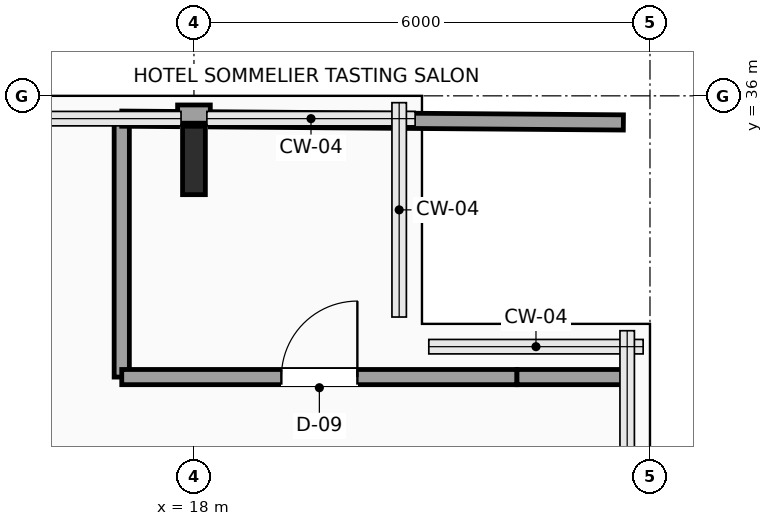
"""IFC4 building model, lengths in metres.
Left out: names, types, materials, properties, quantities, classifications, styles, units other than length and angle.
Written with IfcOpenShell. Run it as: python <this file> out.ifc"""

import sys

from ifc_helpers import new_model, si_unit, direction, frame, frame_2d, origin, origin_2d, place, context, subcontext, project, spatial, rectangle, i_section, extrude, element, fill, save


model = new_model("IFC4")
c1 = context("Model", 3, precision=1e-05, world=origin(), true_north=direction((0.0, 1.0)))
c2 = subcontext(c1, "Body", "Model", "MODEL_VIEW")
j1 = project(units=[si_unit("LENGTHUNIT", "METRE"), si_unit("PLANEANGLEUNIT", "RADIAN")], contexts=[c1])
p1 = place(None, origin())
s1 = spatial("IfcSite", under=j1, at=p1, CompositionType="ELEMENT")
p2 = place(p1, origin())
s2 = spatial("IfcBuilding", under=s1, at=p2, CompositionType="ELEMENT")
p3 = place(p2, frame((0.0, 0.0, 176.7)))
s3 = spatial("IfcBuildingStorey", under=s2, at=p3, CompositionType="ELEMENT", Elevation=176.7)
p4 = place(p3, frame((18.0, 35.15, 0.0), z_axis=(0.0, 0.0, 1.0), x_axis=(1.0, 0.0, 0.0)))
e1 = element("IfcColumn", 1, at=p4, inside=s3, PredefinedType="COLUMN", context=c2, shape_type="SweptSolid", body=[
    extrude(i_section(OverallWidth=0.3, OverallDepth=0.9, WebThickness=0.019, FlangeThickness=0.035, FilletRadius=0.03, at=origin_2d()), origin(), (0.0, 0.0, 1.0), 3.75),
])
p5 = place(p3, frame((17.785, 35.76, 0.0), z_axis=(0.0, 0.0, 1.0), x_axis=(1.0, 0.0, 0.0)))
e2 = element("IfcWall", 2, at=p5, inside=s3, PredefinedType="SOLIDWALL", context=c2, shape_type="SweptSolid", body=[
    extrude(rectangle(XDim=0.43, YDim=0.24, at=frame_2d((0.215, 0.0))), origin(), (0.0, 0.0, 1.0), 3.54),
])
p6 = place(p3, frame((17.05, 35.7, 0.0), z_axis=(0.0, 0.0, 1.0), x_axis=(0.0, -1.0, 0.0)))
e3 = element("IfcWall", 3, at=p6, inside=s3, PredefinedType="PARTITIONING", context=c2, shape_type="SweptSolid", body=[
    extrude(rectangle(XDim=3.4, YDim=0.2, at=frame_2d((1.7, 0.0))), origin(), (0.0, 0.0, 1.0), 3.54),
])
p7 = place(p3, frame((17.05, 32.3, 0.0), z_axis=(0.0, 0.0, 1.0), x_axis=(1.0, 0.0, 0.0)))
e4 = element("IfcWall", 4, at=p7, inside=s3, PredefinedType="PARTITIONING", context=c2, shape_type="SweptSolid", body=[
    extrude(rectangle(XDim=5.2, YDim=0.2, at=frame_2d((2.6, 0.0))), origin(), (0.0, 0.0, 1.0), 3.132),
])
p8 = place(p7, frame((2.1, 0.0, 0.0)))
e5 = element("IfcOpeningElement", 5, at=p8, cuts=e4, PredefinedType="OPENING", context=c2, shape_type="SweptSolid", body=[
    extrude(rectangle(XDim=1.0, YDim=2.2, at=frame_2d((0.5, 1.1))), frame((0.0, 0.11, 0.0), z_axis=(0.0, -1.0, 0.0), x_axis=(1.0, 0.0, 0.0)), (0.0, 0.0, 1.0), 0.22),
])
p9 = place(p3, frame((22.25, 32.3, 0.0), z_axis=(0.0, 0.0, 1.0), x_axis=(1.0, 0.0, 0.0)))
e6 = element("IfcWall", 6, at=p9, inside=s3, PredefinedType="PARTITIONING", context=c2, shape_type="SweptSolid", body=[
    extrude(rectangle(XDim=1.45, YDim=0.2, at=frame_2d((0.725, 0.0))), origin(), (0.0, 0.0, 1.0), 3.54),
])
p10 = place(p3, frame((17.05, 35.7, 0.0), z_axis=(0.0, 0.0, 1.0), x_axis=(0.99997080734, -0.007640972946, 0.0)))
e7 = element("IfcWall", 7, at=p10, inside=s3, PredefinedType="PARTITIONING", context=c2, shape_type="SweptSolid", body=[
    extrude(rectangle(XDim=0.735, YDim=0.2, at=frame_2d((0.367, 0.0))), origin(), (0.0, 0.0, 1.0), 3.54),
])
p11 = place(p3, frame((18.215, 35.691, 0.0), z_axis=(0.0, 0.0, 1.0), x_axis=(0.999971183893, -0.007591533627, 0.0)))
e8 = element("IfcWall", 8, at=p11, inside=s3, PredefinedType="PARTITIONING", context=c2, shape_type="SweptSolid", body=[
    extrude(rectangle(XDim=5.435, YDim=0.2, at=frame_2d((2.718, 0.0))), origin(), (0.0, 0.0, 1.0), 3.54),
])
p12 = place(p8, origin())
e9 = element("IfcDoor", 9, at=p12, inside=s3, OperationType="SINGLE_SWING_RIGHT", PredefinedType="DOOR", context=c2, shape_type="SweptSolid", body=[
    extrude(rectangle(XDim=1.0, YDim=2.2, at=frame_2d((0.5, 1.1))), frame((0.0, 0.025, 0.0), z_axis=(0.0, -1.0, 0.0), x_axis=(1.0, 0.0, 0.0)), (0.0, 0.0, 1.0), 0.05),
])
fill(e5, e9)
save(model, sys.argv[1])
